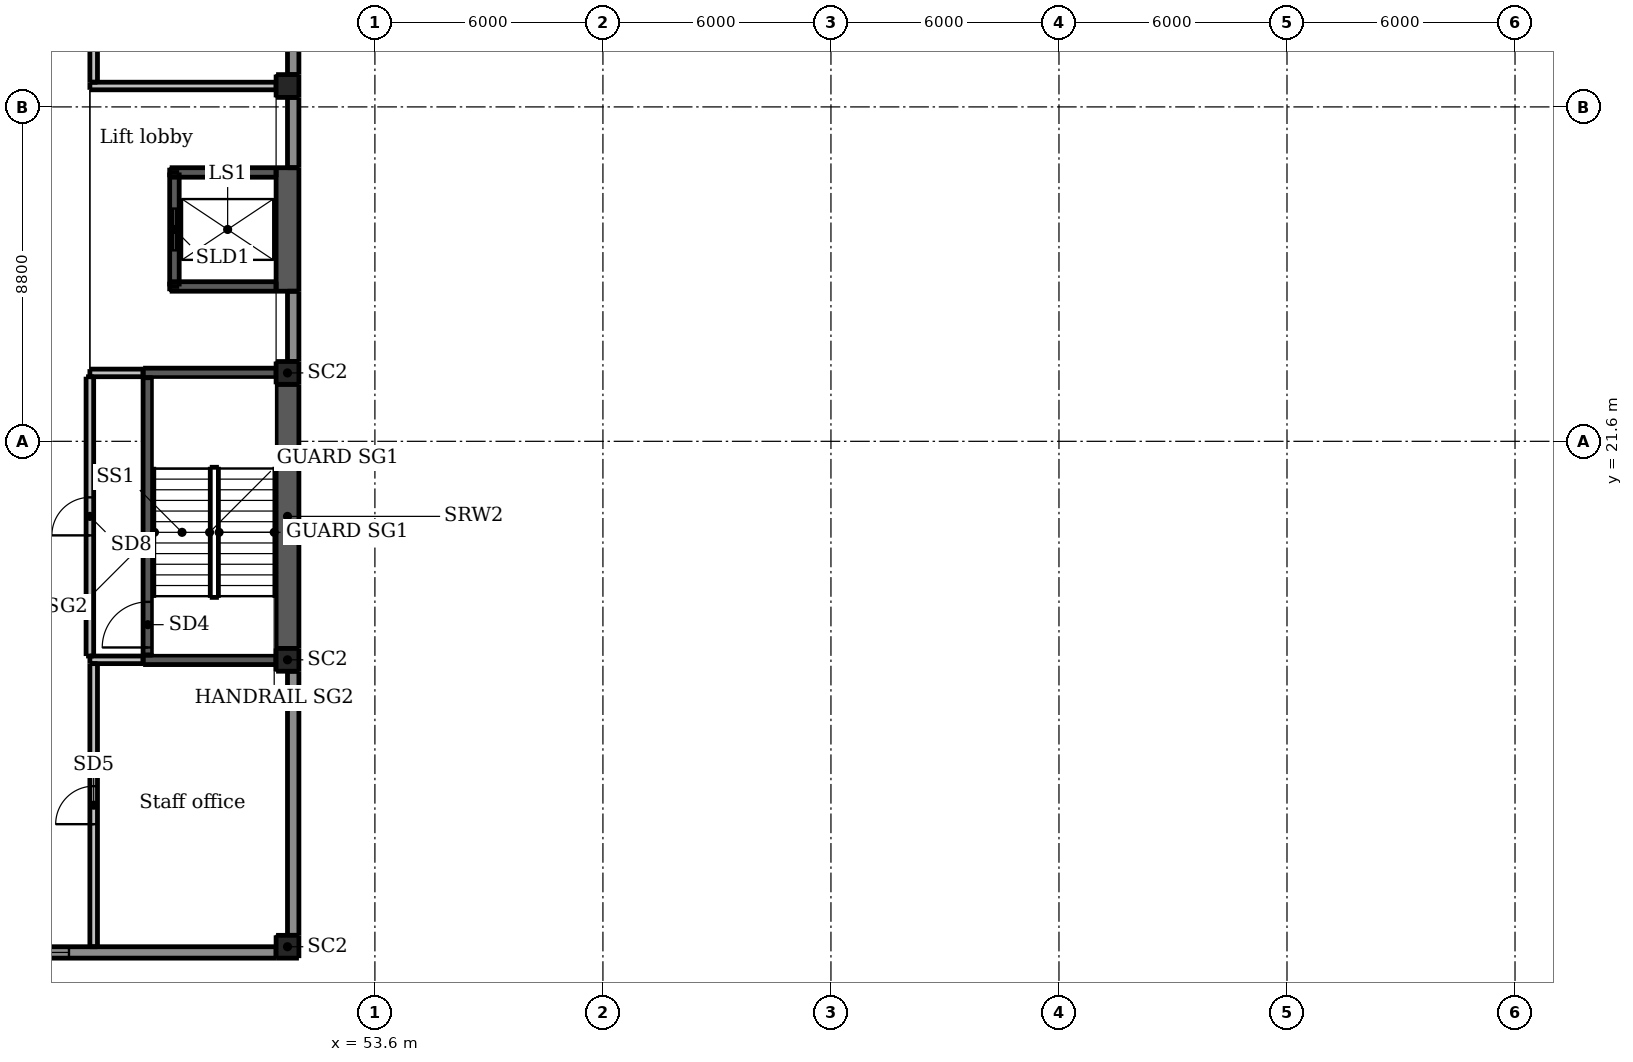
"""IFC4 building model, lengths in metres.
Left out: names, types, materials, properties, quantities, classifications, styles, units other than length and angle.
Written with IfcOpenShell. Run it as: python <this file> out.ifc"""

import sys

from ifc_helpers import new_model, si_unit, direction, frame, frame_2d, origin, origin_2d, place, context, subcontext, project, spatial, rectangle, extrude, element, fill, save


model = new_model("IFC4")
c1 = context("Model", 3, precision=1e-05, world=origin(), true_north=direction((0.0, 1.0)))
c2 = subcontext(c1, "Body", "Model", "MODEL_VIEW")
j1 = project(units=[si_unit("LENGTHUNIT", "METRE"), si_unit("PLANEANGLEUNIT", "RADIAN")], contexts=[c1])
p1 = place(None, origin())
s1 = spatial("IfcSite", under=j1, at=p1, CompositionType="ELEMENT")
p2 = place(p1, origin())
s2 = spatial("IfcBuilding", under=s1, at=p2, CompositionType="ELEMENT")
p3 = place(p2, frame((0.0, 0.0, 14.5)))
s3 = spatial("IfcBuildingStorey", under=s2, at=p3, CompositionType="ELEMENT", Elevation=14.5)
for number, where, z_axis, x_axis in (
    (1, (59.6, 20.6, 0.0), (0.0, 0.0, 1.0), (1.0, 0.0, 0.0)),
    (2, (65.6, 20.6, 0.0), (0.0, 0.0, 1.0), (1.0, 0.0, 0.0)),
    (3, (71.6, 20.6, 0.0), (0.0, 0.0, 1.0), (1.0, 0.0, 0.0)),
    (4, (77.6, 20.6, 0.0), (0.0, 0.0, 1.0), (1.0, 0.0, 0.0)),
    (5, (83.6, 20.6, 0.0), (0.0, 0.0, 1.0), (1.0, 0.0, 0.0)),
    (6, (52.6, 30.4, 0.0), (0.0, 0.0, 1.0), (1.0, 0.0, 0.0)),
):
    element("IfcColumn", number, at=place(p3, frame(where, z_axis=z_axis, x_axis=x_axis)), inside=s3, PredefinedType="COLUMN", context=c2, shape_type="SweptSolid", body=[
        extrude(rectangle(XDim=1.2, YDim=1.2, at=origin_2d()), origin(), (0.0, 0.0, 1.0), 4.2),
    ])
p4 = place(p3, frame((55.2, 23.2, 0.0), z_axis=(0.0, 0.0, 1.0), x_axis=(1.0, 0.0, 0.0)))
e7 = element("IfcColumn", 7, at=p4, inside=s3, PredefinedType="COLUMN", context=c2, shape_type="SweptSolid", body=[
    extrude(rectangle(XDim=3.2, YDim=3.2, at=origin_2d()), origin(), (0.0, 0.0, 1.0), 4.2),
])
for number, where, z_axis, x_axis in (
    (8, (51.3, 8.3, -0.3), (0.0, 0.0, 1.0), (1.0, 0.0, 0.0)),
    (9, (51.3, 15.85, -0.3), (0.0, 0.0, 1.0), (1.0, 0.0, 0.0)),
    (10, (51.3, 23.4, -0.3), (0.0, 0.0, 1.0), (1.0, 0.0, 0.0)),
    (11, (51.3, 30.95, -0.3), (0.0, 0.0, 1.0), (1.0, 0.0, 0.0)),
):
    element("IfcColumn", number, at=place(p3, frame(where, z_axis=z_axis, x_axis=x_axis)), inside=s3, PredefinedType="COLUMN", context=c2, shape_type="SweptSolid", body=[
        extrude(rectangle(XDim=0.6, YDim=0.6, at=origin_2d()), origin(), (0.0, 0.0, 1.0), 4.5),
    ])
p5 = place(p3, frame((47.625, 15.975, -0.3), z_axis=(0.0, 0.0, 1.0), x_axis=(0.0, 1.0, 0.0)))
e12 = element("IfcWall", 12, at=p5, inside=s3, PredefinedType="SHEAR", context=c2, shape_type="SweptSolid", body=[
    extrude(rectangle(XDim=7.3, YDim=0.25, at=frame_2d((3.65, 0.0))), origin(), (0.0, 0.0, 1.0), 4.5),
])
p6 = place(p5, frame((0.2, 0.0, 0.3)))
e13 = element("IfcOpeningElement", 13, at=p6, cuts=e12, PredefinedType="OPENING", context=c2, shape_type="SweptSolid", body=[
    extrude(rectangle(XDim=1.2, YDim=2.1, at=frame_2d((0.6, 1.05))), frame((0.0, 0.135, 0.0), z_axis=(0.0, -1.0, 0.0), x_axis=(1.0, 0.0, 0.0)), (0.0, 0.0, 1.0), 0.27),
])
for number, where, z_axis, x_axis in (
    (14, (47.5, 15.85, -0.3), (0.0, 0.0, 1.0), (1.0, 0.0, 0.0)),
    (15, (47.5, 23.4, -0.3), (0.0, 0.0, 1.0), (1.0, 0.0, 0.0)),
):
    element("IfcWall", number, at=place(p3, frame(where, z_axis=z_axis, x_axis=x_axis)), inside=s3, PredefinedType="SHEAR", context=c2, shape_type="SweptSolid", body=[
        extrude(rectangle(XDim=3.5, YDim=0.25, at=frame_2d((1.75, 0.0))), origin(), (0.0, 0.0, 1.0), 4.5),
    ])
p7 = place(p3, frame((51.3, 16.15, -0.3), z_axis=(0.0, 0.0, 1.0), x_axis=(0.0, 1.0, 0.0)))
e16 = element("IfcWall", 16, at=p7, inside=s3, PredefinedType="SHEAR", context=c2, shape_type="SweptSolid", body=[
    extrude(rectangle(XDim=6.95, YDim=0.6, at=frame_2d((3.475, 0.0))), origin(), (0.0, 0.0, 1.0), 4.5),
])
p8 = place(p3, frame((48.325, 25.675, -0.3), z_axis=(0.0, 0.0, 1.0), x_axis=(0.0, 1.0, 0.0)))
e17 = element("IfcWall", 17, at=p8, inside=s3, PredefinedType="SHEAR", context=c2, shape_type="SweptSolid", body=[
    extrude(rectangle(XDim=3.0, YDim=0.25, at=frame_2d((1.5, 0.0))), origin(), (0.0, 0.0, 1.0), 4.5),
])
p9 = place(p8, frame((0.95, 0.0, 0.3)))
e18 = element("IfcOpeningElement", 18, at=p9, cuts=e17, PredefinedType="OPENING", context=c2, shape_type="SweptSolid", body=[
    extrude(rectangle(XDim=1.1, YDim=2.1, at=frame_2d((0.55, 1.05))), frame((0.0, 0.135, 0.0), z_axis=(0.0, -1.0, 0.0), x_axis=(1.0, 0.0, 0.0)), (0.0, 0.0, 1.0), 0.27),
])
for number, where, z_axis, x_axis in (
    (19, (48.2, 25.675, -0.3), (0.0, 0.0, 1.0), (1.0, 0.0, 0.0)),
    (20, (48.2, 28.675, -0.3), (0.0, 0.0, 1.0), (1.0, 0.0, 0.0)),
):
    element("IfcWall", number, at=place(p3, frame(where, z_axis=z_axis, x_axis=x_axis)), inside=s3, PredefinedType="SHEAR", context=c2, shape_type="SweptSolid", body=[
        extrude(rectangle(XDim=2.8, YDim=0.25, at=frame_2d((1.4, 0.0))), origin(), (0.0, 0.0, 1.0), 4.5),
    ])
p10 = place(p3, frame((51.3, 25.55, -0.3), z_axis=(0.0, 0.0, 1.0), x_axis=(0.0, 1.0, 0.0)))
e21 = element("IfcWall", 21, at=p10, inside=s3, PredefinedType="SHEAR", context=c2, shape_type="SweptSolid", body=[
    extrude(rectangle(XDim=3.25, YDim=0.6, at=frame_2d((1.625, 0.0))), origin(), (0.0, 0.0, 1.0), 4.5),
])
p11 = place(p3, frame((52.125, 20.0, 0.0), z_axis=(0.0, 0.0, 1.0), x_axis=(0.0, 1.0, 0.0)))
e22 = element("IfcWall", 22, at=p11, inside=s3, PredefinedType="SOLIDWALL", context=c2, shape_type="SweptSolid", body=[
    extrude(rectangle(XDim=9.8, YDim=0.25, at=frame_2d((4.9, 0.0))), origin(), (0.0, 0.0, 1.0), 4.2),
])
p12 = place(p3, frame((52.125, 31.0, 0.0), z_axis=(0.0, 0.0, 1.0), x_axis=(0.0, 1.0, 0.0)))
e23 = element("IfcWall", 23, at=p12, inside=s3, PredefinedType="SOLIDWALL", context=c2, shape_type="SweptSolid", body=[
    extrude(rectangle(XDim=4.8, YDim=0.25, at=frame_2d((2.4, 0.0))), origin(), (0.0, 0.0, 1.0), 4.2),
])
p13 = place(p3, frame((36.2, 8.15, 0.0), z_axis=(0.0, 0.0, 1.0), x_axis=(1.0, 0.0, 0.0)))
e24 = element("IfcWall", 24, at=p13, inside=s3, PredefinedType="SOLIDWALL", context=c2, shape_type="SweptSolid", body=[
    extrude(rectangle(XDim=14.8, YDim=0.3, at=frame_2d((7.4, 0.0))), origin(), (0.0, 0.0, 1.0), 3.1),
])
p14 = place(p13, frame((7.85, 0.0, 0.9)))
e25 = element("IfcOpeningElement", 25, at=p14, cuts=e24, PredefinedType="OPENING", context=c2, shape_type="SweptSolid", body=[
    extrude(rectangle(XDim=1.5, YDim=1.5, at=frame_2d((0.75, 0.75))), frame((0.0, 0.16, 0.0), z_axis=(0.0, -1.0, 0.0), x_axis=(1.0, 0.0, 0.0)), (0.0, 0.0, 1.0), 0.32),
])
for number, where, z_axis, x_axis in (
    (26, (51.45, 8.6, 0.0), (0.0, 0.0, 1.0), (0.0, 1.0, 0.0)),
    (27, (51.45, 31.25, 0.0), (0.0, 0.0, 1.0), (0.0, 1.0, 0.0)),
):
    element("IfcWall", number, at=place(p3, frame(where, z_axis=z_axis, x_axis=x_axis)), inside=s3, PredefinedType="SOLIDWALL", context=c2, shape_type="SweptSolid", body=[
        extrude(rectangle(XDim=6.95, YDim=0.3, at=frame_2d((3.475, 0.0))), origin(), (0.0, 0.0, 1.0), 3.3),
    ])
p15 = place(p3, frame((51.45, 23.7, 0.0), z_axis=(0.0, 0.0, 1.0), x_axis=(0.0, 1.0, 0.0)))
e28 = element("IfcWall", 28, at=p15, inside=s3, PredefinedType="SOLIDWALL", context=c2, shape_type="SweptSolid", body=[
    extrude(rectangle(XDim=1.85, YDim=0.3, at=frame_2d((0.925, 0.0))), origin(), (0.0, 0.0, 1.0), 3.3),
])
p16 = place(p3, frame((51.45, 28.8, 0.0), z_axis=(0.0, 0.0, 1.0), x_axis=(0.0, 1.0, 0.0)))
e29 = element("IfcWall", 29, at=p16, inside=s3, PredefinedType="SOLIDWALL", context=c2, shape_type="SweptSolid", body=[
    extrude(rectangle(XDim=1.85, YDim=0.3, at=frame_2d((0.925, 0.0))), origin(), (0.0, 0.0, 1.0), 3.3),
])
p17 = place(p3, frame((53.2, 30.4, 0.0), z_axis=(0.0, 0.0, 1.0), x_axis=(1.0, 0.0, 0.0)))
e30 = element("IfcWall", 30, at=p17, inside=s3, PredefinedType="PARTITIONING", context=c2, shape_type="SweptSolid", body=[
    extrude(rectangle(XDim=6.28, YDim=0.15, at=frame_2d((3.14, 0.0))), origin(), (0.0, 0.0, 1.0), 3.797),
])
p18 = place(p3, frame((59.495, 30.4, 0.0), z_axis=(0.0, 0.0, 1.0), x_axis=(1.0, 0.0, 0.0)))
e31 = element("IfcWall", 31, at=p18, inside=s3, PredefinedType="PARTITIONING", context=c2, shape_type="SweptSolid", body=[
    extrude(rectangle(XDim=0.211, YDim=0.15, at=frame_2d((0.105, 0.0))), origin(), (0.0, 0.0, 1.0), 3.661),
])
p19 = place(p3, frame((59.705, 30.4, 0.0), z_axis=(0.0, 0.0, 1.0), x_axis=(1.0, 0.0, 0.0)))
e32 = element("IfcWall", 32, at=p19, inside=s3, PredefinedType="PARTITIONING", context=c2, shape_type="SweptSolid", body=[
    extrude(rectangle(XDim=5.789, YDim=0.15, at=frame_2d((2.895, 0.0))), origin(), (0.0, 0.0, 1.0), 4.2),
])
p20 = place(p3, frame((65.495, 30.4, 0.0), z_axis=(0.0, 0.0, 1.0), x_axis=(1.0, 0.0, 0.0)))
e33 = element("IfcWall", 33, at=p20, inside=s3, PredefinedType="PARTITIONING", context=c2, shape_type="SweptSolid", body=[
    extrude(rectangle(XDim=0.211, YDim=0.15, at=frame_2d((0.105, 0.0))), origin(), (0.0, 0.0, 1.0), 3.661),
])
p21 = place(p3, frame((65.705, 30.4, 0.0), z_axis=(0.0, 0.0, 1.0), x_axis=(1.0, 0.0, 0.0)))
e34 = element("IfcWall", 34, at=p21, inside=s3, PredefinedType="PARTITIONING", context=c2, shape_type="SweptSolid", body=[
    extrude(rectangle(XDim=5.789, YDim=0.15, at=frame_2d((2.895, 0.0))), origin(), (0.0, 0.0, 1.0), 4.2),
])
p22 = place(p21, frame((1.995, 0.0, 0.0)))
e35 = element("IfcOpeningElement", 35, at=p22, cuts=e34, PredefinedType="OPENING", context=c2, shape_type="SweptSolid", body=[
    extrude(rectangle(XDim=1.8, YDim=2.1, at=frame_2d((0.9, 1.05))), frame((0.0, 0.085, 0.0), z_axis=(0.0, -1.0, 0.0), x_axis=(1.0, 0.0, 0.0)), (0.0, 0.0, 1.0), 0.17),
])
p23 = place(p3, frame((71.495, 30.4, 0.0), z_axis=(0.0, 0.0, 1.0), x_axis=(1.0, 0.0, 0.0)))
e36 = element("IfcWall", 36, at=p23, inside=s3, PredefinedType="PARTITIONING", context=c2, shape_type="SweptSolid", body=[
    extrude(rectangle(XDim=0.211, YDim=0.15, at=frame_2d((0.105, 0.0))), origin(), (0.0, 0.0, 1.0), 3.661),
])
p24 = place(p3, frame((71.705, 30.4, 0.0), z_axis=(0.0, 0.0, 1.0), x_axis=(1.0, 0.0, 0.0)))
e37 = element("IfcWall", 37, at=p24, inside=s3, PredefinedType="PARTITIONING", context=c2, shape_type="SweptSolid", body=[
    extrude(rectangle(XDim=5.789, YDim=0.15, at=frame_2d((2.895, 0.0))), origin(), (0.0, 0.0, 1.0), 4.2),
])
p25 = place(p3, frame((77.495, 30.4, 0.0), z_axis=(0.0, 0.0, 1.0), x_axis=(1.0, 0.0, 0.0)))
e38 = element("IfcWall", 38, at=p25, inside=s3, PredefinedType="PARTITIONING", context=c2, shape_type="SweptSolid", body=[
    extrude(rectangle(XDim=0.211, YDim=0.15, at=frame_2d((0.105, 0.0))), origin(), (0.0, 0.0, 1.0), 3.661),
])
p26 = place(p3, frame((77.705, 30.4, 0.0), z_axis=(0.0, 0.0, 1.0), x_axis=(1.0, 0.0, 0.0)))
e39 = element("IfcWall", 39, at=p26, inside=s3, PredefinedType="PARTITIONING", context=c2, shape_type="SweptSolid", body=[
    extrude(rectangle(XDim=5.789, YDim=0.15, at=frame_2d((2.895, 0.0))), origin(), (0.0, 0.0, 1.0), 4.2),
])
p27 = place(p26, frame((2.395, 0.0, 0.0)))
e40 = element("IfcOpeningElement", 40, at=p27, cuts=e39, PredefinedType="OPENING", context=c2, shape_type="SweptSolid", body=[
    extrude(rectangle(XDim=1.0, YDim=2.1, at=frame_2d((0.5, 1.05))), frame((0.0, 0.085, 0.0), z_axis=(0.0, -1.0, 0.0), x_axis=(1.0, 0.0, 0.0)), (0.0, 0.0, 1.0), 0.17),
])
p28 = place(p3, frame((83.495, 30.4, 0.0), z_axis=(0.0, 0.0, 1.0), x_axis=(1.0, 0.0, 0.0)))
e41 = element("IfcWall", 41, at=p28, inside=s3, PredefinedType="PARTITIONING", context=c2, shape_type="SweptSolid", body=[
    extrude(rectangle(XDim=0.211, YDim=0.15, at=frame_2d((0.105, 0.0))), origin(), (0.0, 0.0, 1.0), 3.661),
])
p29 = place(p3, frame((83.705, 30.4, 0.0), z_axis=(0.0, 0.0, 1.0), x_axis=(1.0, 0.0, 0.0)))
e42 = element("IfcWall", 42, at=p29, inside=s3, PredefinedType="PARTITIONING", context=c2, shape_type="SweptSolid", body=[
    extrude(rectangle(XDim=5.789, YDim=0.15, at=frame_2d((2.895, 0.0))), origin(), (0.0, 0.0, 1.0), 4.2),
])
p30 = place(p29, frame((2.395, 0.0, 0.0)))
e43 = element("IfcOpeningElement", 43, at=p30, cuts=e42, PredefinedType="OPENING", context=c2, shape_type="SweptSolid", body=[
    extrude(rectangle(XDim=1.0, YDim=2.1, at=frame_2d((0.5, 1.05))), frame((0.0, 0.085, 0.0), z_axis=(0.0, -1.0, 0.0), x_axis=(1.0, 0.0, 0.0)), (0.0, 0.0, 1.0), 0.17),
])
p31 = place(p3, frame((59.6, 30.475, 0.0), z_axis=(0.0, 0.0, 1.0), x_axis=(0.0, 1.0, 0.0)))
e44 = element("IfcWall", 44, at=p31, inside=s3, PredefinedType="PARTITIONING", context=c2, shape_type="SweptSolid", body=[
    extrude(rectangle(XDim=5.82, YDim=0.15, at=frame_2d((2.91, 0.0))), origin(), (0.0, 0.0, 1.0), 3.661),
])
p32 = place(p31, frame((2.025, 0.0, 0.0)))
e45 = element("IfcOpeningElement", 45, at=p32, cuts=e44, PredefinedType="OPENING", context=c2, shape_type="SweptSolid", body=[
    extrude(rectangle(XDim=1.8, YDim=2.1, at=frame_2d((0.9, 1.05))), frame((0.0, 0.085, 0.0), z_axis=(0.0, -1.0, 0.0), x_axis=(1.0, 0.0, 0.0)), (0.0, 0.0, 1.0), 0.17),
])
for number, where, z_axis, x_axis in (
    (46, (77.6, 21.2, 0.0), (0.0, 0.0, 1.0), (0.0, 1.0, 0.0)),
    (47, (83.6, 21.2, 0.0), (0.0, 0.0, 1.0), (0.0, 1.0, 0.0)),
):
    element("IfcWall", number, at=place(p3, frame(where, z_axis=z_axis, x_axis=x_axis)), inside=s3, PredefinedType="PARTITIONING", context=c2, shape_type="SweptSolid", body=[
        extrude(rectangle(XDim=9.125, YDim=0.1, at=frame_2d((4.562, 0.0))), origin(), (0.0, 0.0, 1.0), 3.661),
    ])
p33 = place(p3, frame((46.2, 8.3, 0.0), z_axis=(0.0, 0.0, 1.0), x_axis=(0.0, 1.0, 0.0)))
e48 = element("IfcWall", 48, at=p33, inside=s3, PredefinedType="PARTITIONING", context=c2, shape_type="SweptSolid", body=[
    extrude(rectangle(XDim=7.45, YDim=0.2, at=frame_2d((3.725, 0.0))), origin(), (0.0, 0.0, 1.0), 3.1),
])
p34 = place(p33, frame((3.225, 0.0, 0.0)))
e49 = element("IfcOpeningElement", 49, at=p34, cuts=e48, PredefinedType="OPENING", context=c2, shape_type="SweptSolid", body=[
    extrude(rectangle(XDim=1.0, YDim=2.1, at=frame_2d((0.5, 1.05))), frame((0.0, 0.11, 0.0), z_axis=(0.0, -1.0, 0.0), x_axis=(1.0, 0.0, 0.0)), (0.0, 0.0, 1.0), 0.22),
])
p35 = place(p3, frame((46.2, 31.05, 0.0), z_axis=(0.0, 0.0, 1.0), x_axis=(0.0, 1.0, 0.0)))
e50 = element("IfcWall", 50, at=p35, inside=s3, PredefinedType="PARTITIONING", context=c2, shape_type="SweptSolid", body=[
    extrude(rectangle(XDim=7.35, YDim=0.2, at=frame_2d((3.675, 0.0))), origin(), (0.0, 0.0, 1.0), 3.1),
])
p36 = place(p35, frame((3.225, 0.0, 0.0)))
e51 = element("IfcOpeningElement", 51, at=p36, cuts=e50, PredefinedType="OPENING", context=c2, shape_type="SweptSolid", body=[
    extrude(rectangle(XDim=0.9, YDim=2.1, at=frame_2d((0.45, 1.05))), frame((0.0, 0.11, 0.0), z_axis=(0.0, -1.0, 0.0), x_axis=(1.0, 0.0, 0.0)), (0.0, 0.0, 1.0), 0.22),
])
for number, where, z_axis, x_axis in (
    (52, (46.1, 15.85, 0.0), (0.0, 0.0, 1.0), (1.0, 0.0, 0.0)),
    (53, (46.1, 23.4, 0.0), (0.0, 0.0, 1.0), (1.0, 0.0, 0.0)),
):
    element("IfcWall", number, at=place(p3, frame(where, z_axis=z_axis, x_axis=x_axis)), inside=s3, PredefinedType="PARTITIONING", context=c2, shape_type="SweptSolid", body=[
        extrude(rectangle(XDim=1.4, YDim=0.2, at=frame_2d((0.7, 0.0))), origin(), (0.0, 0.0, 1.0), 3.1),
    ])
p37 = place(p3, frame((46.1, 30.95, 0.0), z_axis=(0.0, 0.0, 1.0), x_axis=(1.0, 0.0, 0.0)))
e54 = element("IfcWall", 54, at=p37, inside=s3, PredefinedType="PARTITIONING", context=c2, shape_type="SweptSolid", body=[
    extrude(rectangle(XDim=4.9, YDim=0.2, at=frame_2d((2.45, 0.0))), origin(), (0.0, 0.0, 1.0), 3.1),
])
p38 = place(p3, frame((46.1, 15.95, 0.0), z_axis=(0.0, 0.0, 1.0), x_axis=(0.0, 1.0, 0.0)))
e55 = element("IfcWall", 55, at=p38, inside=s3, PredefinedType="PARTITIONING", context=c2, shape_type="SweptSolid", body=[
    extrude(rectangle(XDim=7.35, YDim=0.2, at=frame_2d((3.675, 0.0))), origin(), (0.0, 0.0, 1.0), 3.1),
])
p39 = place(p38, frame((3.175, 0.0, 0.0)))
e56 = element("IfcOpeningElement", 56, at=p39, cuts=e55, PredefinedType="OPENING", context=c2, shape_type="SweptSolid", body=[
    extrude(rectangle(XDim=1.0, YDim=2.1, at=frame_2d((0.5, 1.05))), frame((0.0, 0.11, 0.0), z_axis=(0.0, -1.0, 0.0), x_axis=(1.0, 0.0, 0.0)), (0.0, 0.0, 1.0), 0.22),
])
p40 = place(p14, origin())
e57 = element("IfcWindow", 57, at=p40, inside=s3, PartitioningType="DOUBLE_PANEL_HORIZONTAL", PredefinedType="WINDOW", context=c2, shape_type="SweptSolid", body=[
    extrude(rectangle(XDim=1.5, YDim=1.5, at=frame_2d((0.75, 0.75))), frame((0.0, 0.03, 0.0), z_axis=(0.0, -1.0, 0.0), x_axis=(1.0, 0.0, 0.0)), (0.0, 0.0, 1.0), 0.06),
])
fill(e25, e57)
p41 = place(p22, origin())
e58 = element("IfcDoor", 58, at=p41, inside=s3, OperationType="DOUBLE_DOOR_SINGLE_SWING", PredefinedType="DOOR", context=c2, shape_type="SweptSolid", body=[
    extrude(rectangle(XDim=1.8, YDim=2.1, at=frame_2d((0.9, 1.05))), frame((0.0, 0.025, 0.0), z_axis=(0.0, -1.0, 0.0), x_axis=(1.0, 0.0, 0.0)), (0.0, 0.0, 1.0), 0.05),
])
fill(e35, e58)
p42 = place(p27, origin())
e59 = element("IfcDoor", 59, at=p42, inside=s3, OperationType="SINGLE_SWING_LEFT", PredefinedType="DOOR", context=c2, shape_type="SweptSolid", body=[
    extrude(rectangle(XDim=1.0, YDim=2.1, at=frame_2d((0.5, 1.05))), frame((0.0, 0.025, 0.0), z_axis=(0.0, -1.0, 0.0), x_axis=(1.0, 0.0, 0.0)), (0.0, 0.0, 1.0), 0.05),
])
fill(e40, e59)
p43 = place(p34, origin())
e60 = element("IfcDoor", 60, at=p43, inside=s3, OperationType="SINGLE_SWING_LEFT", PredefinedType="DOOR", context=c2, shape_type="SweptSolid", body=[
    extrude(rectangle(XDim=1.0, YDim=2.1, at=frame_2d((0.5, 1.05))), frame((0.0, 0.025, 0.0), z_axis=(0.0, -1.0, 0.0), x_axis=(1.0, 0.0, 0.0)), (0.0, 0.0, 1.0), 0.05),
])
fill(e49, e60)
p44 = place(p39, origin())
e61 = element("IfcDoor", 61, at=p44, inside=s3, OperationType="SINGLE_SWING_LEFT", PredefinedType="DOOR", context=c2, shape_type="SweptSolid", body=[
    extrude(rectangle(XDim=1.0, YDim=2.1, at=frame_2d((0.5, 1.05))), frame((0.0, 0.025, 0.0), z_axis=(0.0, -1.0, 0.0), x_axis=(1.0, 0.0, 0.0)), (0.0, 0.0, 1.0), 0.05),
])
fill(e56, e61)
p45 = place(p6, origin())
e62 = element("IfcDoor", 62, at=p45, inside=s3, OperationType="SINGLE_SWING_LEFT", PredefinedType="DOOR", context=c2, shape_type="SweptSolid", body=[
    extrude(rectangle(XDim=1.2, YDim=2.1, at=frame_2d((0.6, 1.05))), frame((0.0, 0.025, 0.0), z_axis=(0.0, -1.0, 0.0), x_axis=(1.0, 0.0, 0.0)), (0.0, 0.0, 1.0), 0.05),
])
fill(e13, e62)
p46 = place(p9, origin())
e63 = element("IfcDoor", 63, at=p46, inside=s3, OperationType="SLIDING_TO_LEFT", PredefinedType="DOOR", context=c2, shape_type="SweptSolid", body=[
    extrude(rectangle(XDim=1.1, YDim=2.1, at=frame_2d((0.55, 1.05))), frame((0.0, 0.025, 0.0), z_axis=(0.0, -1.0, 0.0), x_axis=(1.0, 0.0, 0.0)), (0.0, 0.0, 1.0), 0.05),
])
fill(e18, e63)
save(model, sys.argv[1])
